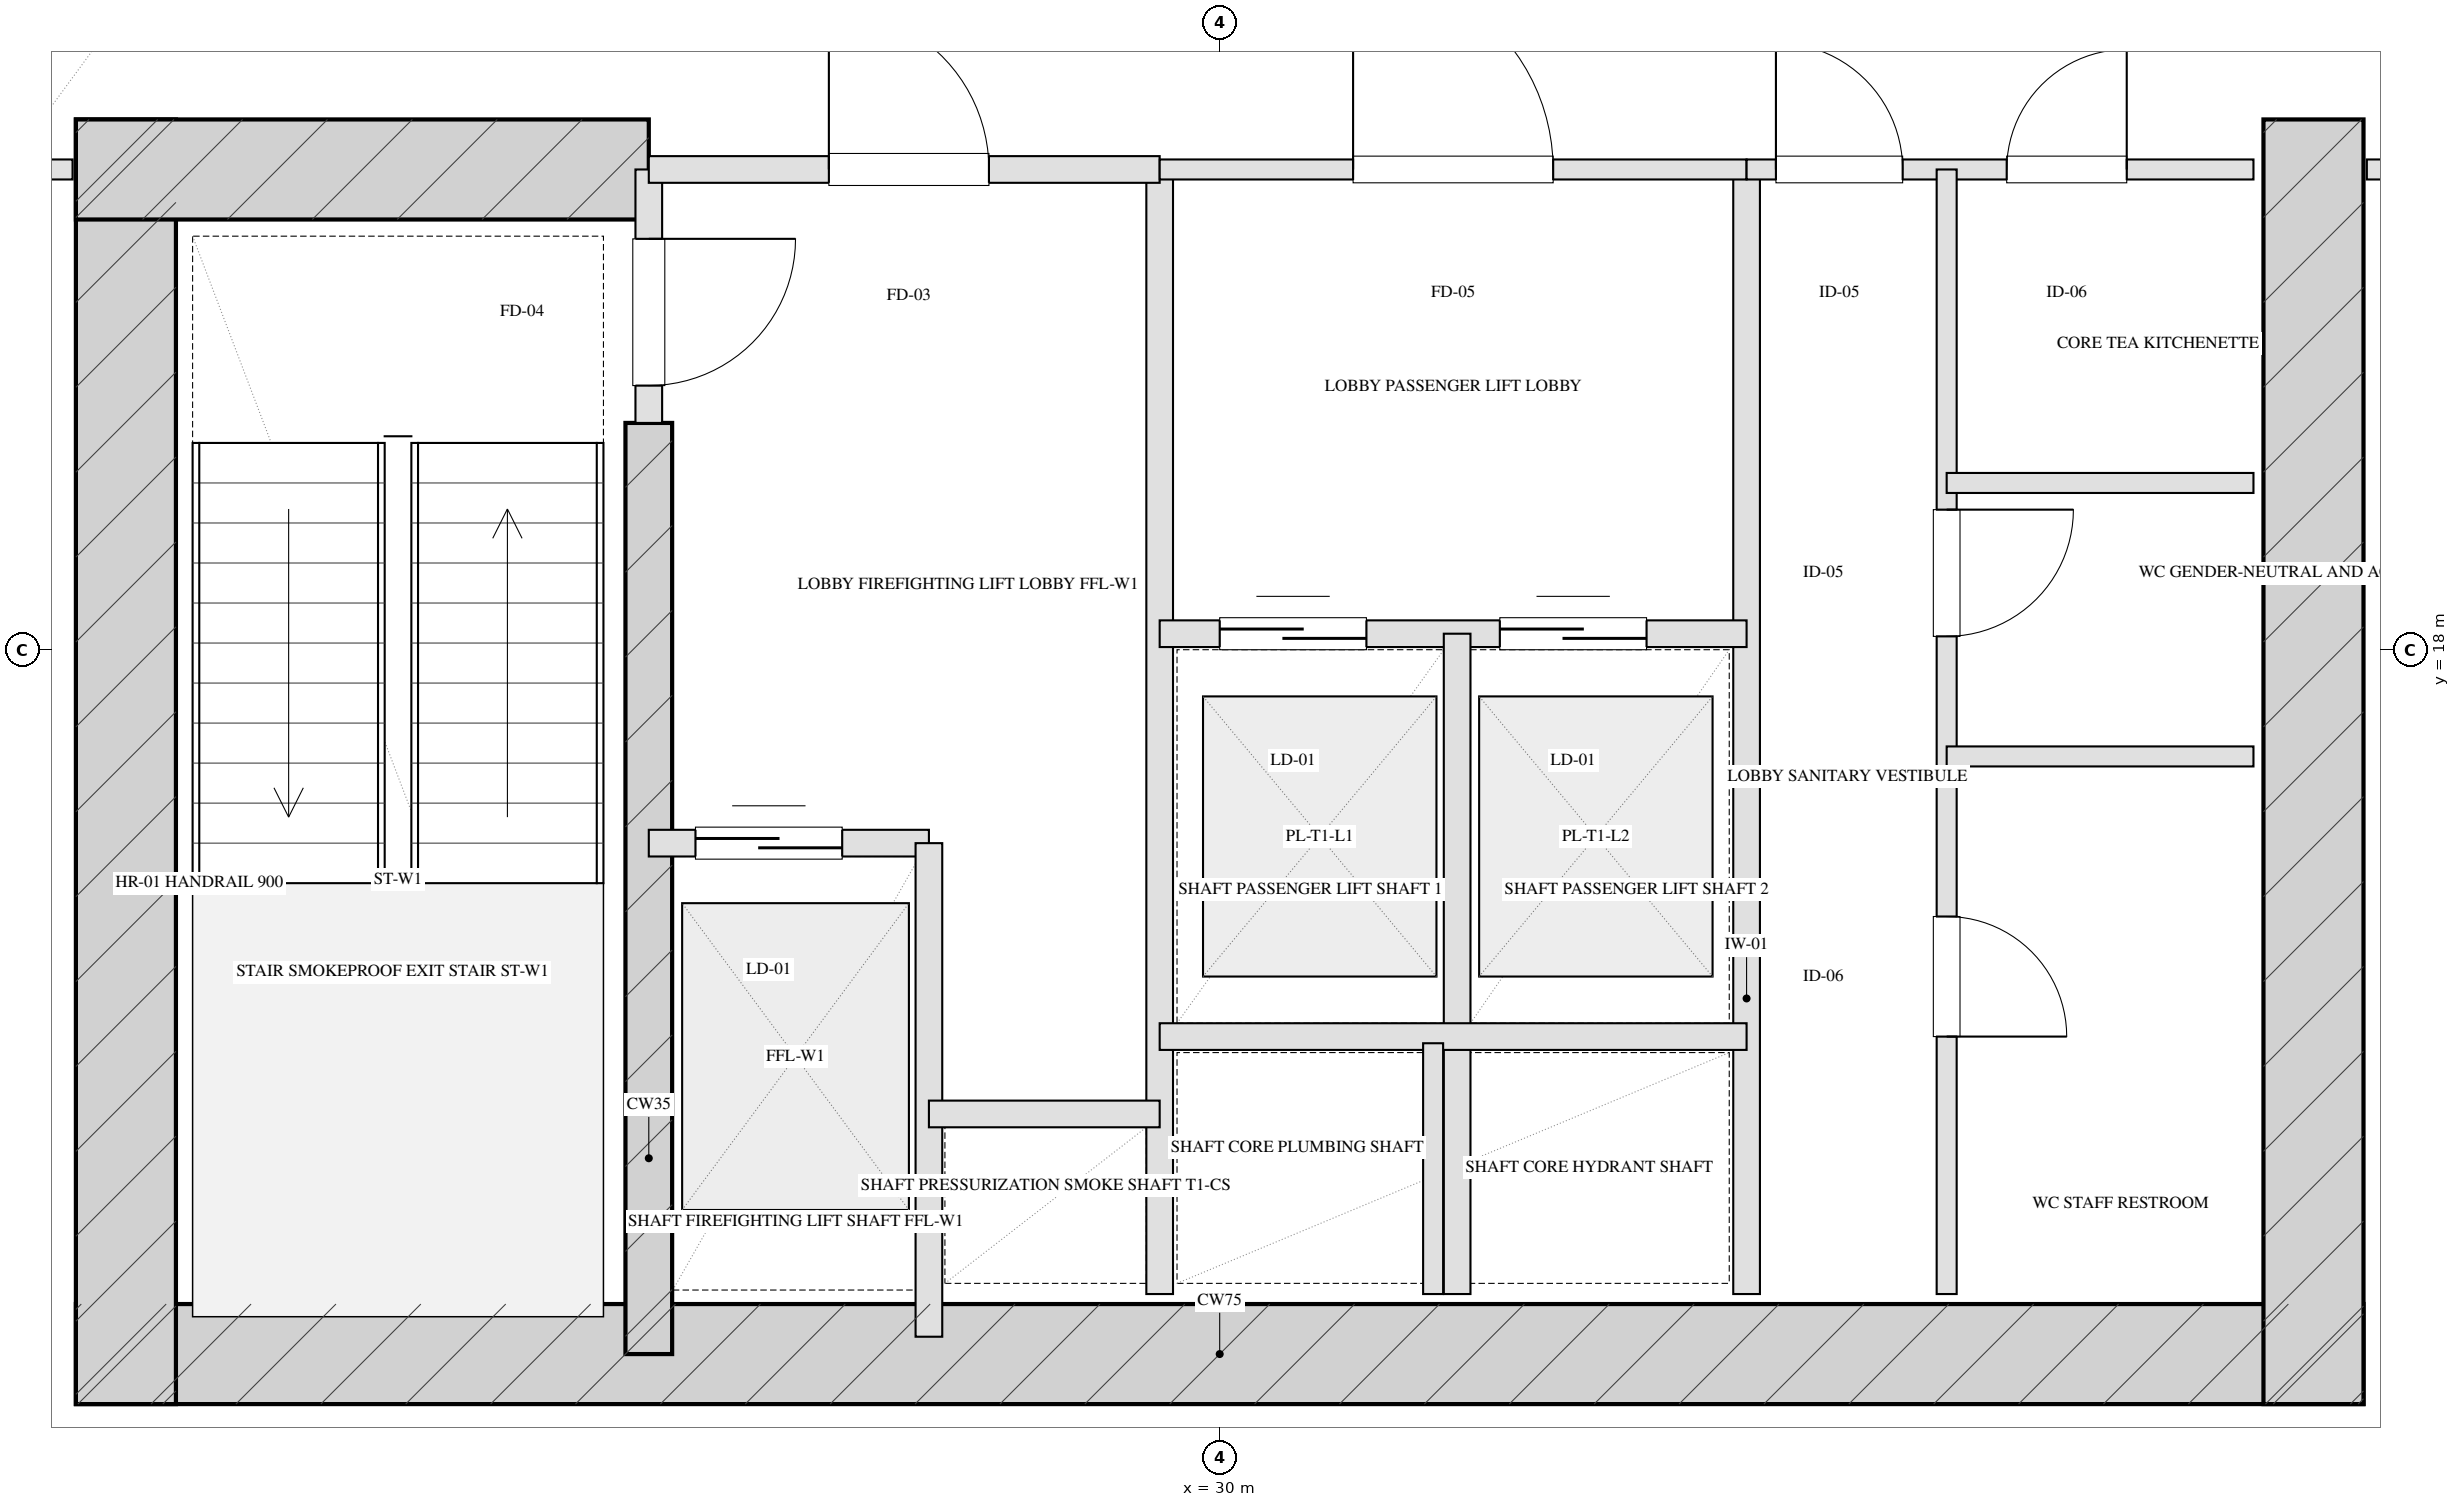
"""IFC4 building model, lengths in metres.
Left out: names, types, materials, properties, quantities, classifications, styles, units other than length and angle.
Written with IfcOpenShell. Run it as: python <this file> out.ifc"""

import sys

from ifc_helpers import new_model, si_unit, direction, frame, frame_2d, origin, place, context, subcontext, project, spatial, rectangle, extrude, element, fill, save


model = new_model("IFC4")
c1 = context("Model", 3, precision=1e-05, world=origin(), true_north=direction((0.0, 1.0)))
c2 = subcontext(c1, "Body", "Model", "MODEL_VIEW")
j1 = project(units=[si_unit("LENGTHUNIT", "METRE"), si_unit("PLANEANGLEUNIT", "RADIAN")], contexts=[c1])
p1 = place(None, origin())
s1 = spatial("IfcSite", under=j1, at=p1, CompositionType="ELEMENT")
p2 = place(p1, origin())
s2 = spatial("IfcBuilding", under=s1, at=p2, CompositionType="ELEMENT")
p3 = place(p2, frame((0.0, 0.0, 26.0)))
s3 = spatial("IfcBuildingStorey", under=s2, at=p3, CompositionType="ELEMENT", Elevation=26.0)
p4 = place(p3, frame((21.425, 12.72, 0.0), z_axis=(0.0, 0.0, 1.0), x_axis=(1.0, 0.0, 0.0)))
e1 = element("IfcWall", 1, at=p4, inside=s3, PredefinedType="SHEAR", context=c2, shape_type="SweptSolid", body=[
    extrude(rectangle(XDim=17.15, YDim=0.75, at=frame_2d((8.575, 0.0))), origin(), (0.0, 0.0, 1.0), 4.0),
])
for number, where, z_axis, x_axis in (
    (2, (21.8, 21.975, 0.0), (0.0, 0.0, 1.0), (0.0, -1.0, 0.0)),
    (3, (38.2, 21.975, 0.0), (0.0, 0.0, 1.0), (0.0, -1.0, 0.0)),
):
    element("IfcWall", number, at=place(p3, frame(where, z_axis=z_axis, x_axis=x_axis)), inside=s3, PredefinedType="SHEAR", context=c2, shape_type="SweptSolid", body=[
        extrude(rectangle(XDim=9.63, YDim=0.75, at=frame_2d((4.815, 0.0))), origin(), (0.0, 0.0, 1.0), 4.0),
    ])
p5 = place(p3, frame((25.72, 19.7, 0.0), z_axis=(0.0, 0.0, 1.0), x_axis=(0.0, -1.0, 0.0)))
e4 = element("IfcWall", 4, at=p5, inside=s3, PredefinedType="SHEAR", context=c2, shape_type="SweptSolid", body=[
    extrude(rectangle(XDim=6.98, YDim=0.35, at=frame_2d((3.49, 0.0))), origin(), (0.0, 0.0, 1.0), 4.0),
])
p6 = place(p3, frame((21.425, 21.6, 0.0), z_axis=(0.0, 0.0, 1.0), x_axis=(1.0, 0.0, 0.0)))
e5 = element("IfcWall", 5, at=p6, inside=s3, PredefinedType="SHEAR", context=c2, shape_type="SweptSolid", body=[
    extrude(rectangle(XDim=4.295, YDim=0.75, at=frame_2d((2.147, 0.0))), origin(), (0.0, 0.0, 1.0), 4.0),
])
p7 = place(p3, frame((25.72, 21.6, 0.0), z_axis=(0.0, 0.0, 1.0), x_axis=(0.0, -1.0, 0.0)))
e6 = element("IfcWall", 6, at=p7, inside=s3, PredefinedType="PARTITIONING", context=c2, shape_type="SweptSolid", body=[
    extrude(rectangle(XDim=1.9, YDim=0.2, at=frame_2d((0.95, 0.0))), origin(), (0.0, 0.0, 1.0), 3.725),
])
p8 = place(p7, frame((0.52, 0.0, 0.0)))
e7 = element("IfcOpeningElement", 7, at=p8, cuts=e6, PredefinedType="OPENING", context=c2, shape_type="SweptSolid", body=[
    extrude(rectangle(XDim=1.1, YDim=2.05, at=frame_2d((0.55, 1.025))), frame((0.0, 0.11, 0.0), z_axis=(0.0, -1.0, 0.0), x_axis=(1.0, 0.0, 0.0)), (0.0, 0.0, 1.0), 0.22),
])
p9 = place(p3, frame((29.55, 21.6, 0.0), z_axis=(0.0, 0.0, 1.0), x_axis=(0.0, -1.0, 0.0)))
e8 = element("IfcWall", 8, at=p9, inside=s3, PredefinedType="PARTITIONING", context=c2, shape_type="SweptSolid", body=[
    extrude(rectangle(XDim=8.43, YDim=0.2, at=frame_2d((4.215, 0.0))), origin(), (0.0, 0.0, 1.0), 3.725),
])
p10 = place(p3, frame((25.72, 21.6, 0.0), z_axis=(0.0, 0.0, 1.0), x_axis=(1.0, 0.0, 0.0)))
e9 = element("IfcWall", 9, at=p10, inside=s3, PredefinedType="PARTITIONING", context=c2, shape_type="SweptSolid", body=[
    extrude(rectangle(XDim=3.83, YDim=0.2, at=frame_2d((1.915, 0.0))), origin(), (0.0, 0.0, 1.0), 3.725),
])
p11 = place(p10, frame((1.35, 0.0, 0.0)))
e10 = element("IfcOpeningElement", 10, at=p11, cuts=e9, PredefinedType="OPENING", context=c2, shape_type="SweptSolid", body=[
    extrude(rectangle(XDim=1.2, YDim=2.05, at=frame_2d((0.6, 1.025))), frame((0.0, 0.11, 0.0), z_axis=(0.0, -1.0, 0.0), x_axis=(1.0, 0.0, 0.0)), (0.0, 0.0, 1.0), 0.22),
])
p12 = place(p3, frame((25.72, 16.55, 0.0), z_axis=(0.0, 0.0, 1.0), x_axis=(1.0, 0.0, 0.0)))
e11 = element("IfcWall", 11, at=p12, inside=s3, PredefinedType="PARTITIONING", context=c2, shape_type="SweptSolid", body=[
    extrude(rectangle(XDim=2.1, YDim=0.2, at=frame_2d((1.05, 0.0))), origin(), (0.0, 0.0, 1.0), 3.725),
])
p13 = place(p12, frame((0.35, 0.0, 0.0)))
e12 = element("IfcOpeningElement", 12, at=p13, cuts=e11, PredefinedType="OPENING", context=c2, shape_type="SweptSolid", body=[
    extrude(rectangle(XDim=1.1, YDim=2.05, at=frame_2d((0.55, 1.025))), frame((0.0, 0.11, 0.0), z_axis=(0.0, -1.0, 0.0), x_axis=(1.0, 0.0, 0.0)), (0.0, 0.0, 1.0), 0.22),
])
p14 = place(p3, frame((27.82, 16.55, 0.0), z_axis=(0.0, 0.0, 1.0), x_axis=(0.0, -1.0, 0.0)))
e13 = element("IfcWall", 13, at=p14, inside=s3, PredefinedType="PARTITIONING", context=c2, shape_type="SweptSolid", body=[
    extrude(rectangle(XDim=3.7, YDim=0.2, at=frame_2d((1.85, 0.0))), origin(), (0.0, 0.0, 1.0), 3.725),
])
p15 = place(p3, frame((27.82, 14.52, 0.0), z_axis=(0.0, 0.0, 1.0), x_axis=(1.0, 0.0, 0.0)))
e14 = element("IfcWall", 14, at=p15, inside=s3, PredefinedType="PARTITIONING", context=c2, shape_type="SweptSolid", body=[
    extrude(rectangle(XDim=1.73, YDim=0.2, at=frame_2d((0.865, 0.0))), origin(), (0.0, 0.0, 1.0), 3.725),
])
p16 = place(p3, frame((33.95, 21.6, 0.0), z_axis=(0.0, 0.0, 1.0), x_axis=(0.0, -1.0, 0.0)))
e15 = element("IfcWall", 15, at=p16, inside=s3, PredefinedType="PARTITIONING", context=c2, shape_type="SweptSolid", body=[
    extrude(rectangle(XDim=8.43, YDim=0.2, at=frame_2d((4.215, 0.0))), origin(), (0.0, 0.0, 1.0), 3.725),
])
p17 = place(p3, frame((29.55, 21.6, 0.0), z_axis=(0.0, 0.0, 1.0), x_axis=(1.0, 0.0, 0.0)))
e16 = element("IfcWall", 16, at=p17, inside=s3, PredefinedType="PARTITIONING", context=c2, shape_type="SweptSolid", body=[
    extrude(rectangle(XDim=4.4, YDim=0.15, at=frame_2d((2.2, 0.0))), origin(), (0.0, 0.0, 1.0), 3.725),
])
p18 = place(p17, frame((1.45, 0.0, 0.0)))
e17 = element("IfcOpeningElement", 17, at=p18, cuts=e16, PredefinedType="OPENING", context=c2, shape_type="SweptSolid", body=[
    extrude(rectangle(XDim=1.5, YDim=2.05, at=frame_2d((0.75, 1.025))), frame((0.0, 0.085, 0.0), z_axis=(0.0, -1.0, 0.0), x_axis=(1.0, 0.0, 0.0)), (0.0, 0.0, 1.0), 0.17),
])
p19 = place(p3, frame((29.55, 18.12, 0.0), z_axis=(0.0, 0.0, 1.0), x_axis=(1.0, 0.0, 0.0)))
e18 = element("IfcWall", 18, at=p19, inside=s3, PredefinedType="PARTITIONING", context=c2, shape_type="SweptSolid", body=[
    extrude(rectangle(XDim=4.4, YDim=0.2, at=frame_2d((2.2, 0.0))), origin(), (0.0, 0.0, 1.0), 3.725),
])
p20 = place(p19, frame((0.45, 0.0, 0.0)))
e19 = element("IfcOpeningElement", 19, at=p20, cuts=e18, PredefinedType="OPENING", context=c2, shape_type="SweptSolid", body=[
    extrude(rectangle(XDim=1.1, YDim=2.05, at=frame_2d((0.55, 1.025))), frame((0.0, 0.11, 0.0), z_axis=(0.0, -1.0, 0.0), x_axis=(1.0, 0.0, 0.0)), (0.0, 0.0, 1.0), 0.22),
])
p21 = place(p19, frame((2.55, 0.0, 0.0)))
e20 = element("IfcOpeningElement", 20, at=p21, cuts=e18, PredefinedType="OPENING", context=c2, shape_type="SweptSolid", body=[
    extrude(rectangle(XDim=1.1, YDim=2.05, at=frame_2d((0.55, 1.025))), frame((0.0, 0.11, 0.0), z_axis=(0.0, -1.0, 0.0), x_axis=(1.0, 0.0, 0.0)), (0.0, 0.0, 1.0), 0.22),
])
p22 = place(p3, frame((31.78, 18.12, 0.0), z_axis=(0.0, 0.0, 1.0), x_axis=(0.0, -1.0, 0.0)))
e21 = element("IfcWall", 21, at=p22, inside=s3, PredefinedType="PARTITIONING", context=c2, shape_type="SweptSolid", body=[
    extrude(rectangle(XDim=4.95, YDim=0.2, at=frame_2d((2.475, 0.0))), origin(), (0.0, 0.0, 1.0), 3.725),
])
p23 = place(p3, frame((29.55, 15.1, 0.0), z_axis=(0.0, 0.0, 1.0), x_axis=(1.0, 0.0, 0.0)))
e22 = element("IfcWall", 22, at=p23, inside=s3, PredefinedType="PARTITIONING", context=c2, shape_type="SweptSolid", body=[
    extrude(rectangle(XDim=4.4, YDim=0.2, at=frame_2d((2.2, 0.0))), origin(), (0.0, 0.0, 1.0), 3.725),
])
p24 = place(p3, frame((31.6, 15.05, 0.0), z_axis=(0.0, 0.0, 1.0), x_axis=(0.0, -1.0, 0.0)))
e23 = element("IfcWall", 23, at=p24, inside=s3, PredefinedType="PARTITIONING", context=c2, shape_type="SweptSolid", body=[
    extrude(rectangle(XDim=1.88, YDim=0.15, at=frame_2d((0.94, 0.0))), origin(), (0.0, 0.0, 1.0), 3.725),
])
p25 = place(p3, frame((33.95, 21.6, 0.0), z_axis=(0.0, 0.0, 1.0), x_axis=(1.0, 0.0, 0.0)))
e24 = element("IfcWall", 24, at=p25, inside=s3, PredefinedType="PARTITIONING", context=c2, shape_type="SweptSolid", body=[
    extrude(rectangle(XDim=3.8, YDim=0.15, at=frame_2d((1.9, 0.0))), origin(), (0.0, 0.0, 1.0), 3.725),
])
p26 = place(p25, frame((0.22, 0.0, 0.0)))
e25 = element("IfcOpeningElement", 25, at=p26, cuts=e24, PredefinedType="OPENING", context=c2, shape_type="SweptSolid", body=[
    extrude(rectangle(XDim=0.95, YDim=2.05, at=frame_2d((0.475, 1.025))), frame((0.0, 0.085, 0.0), z_axis=(0.0, -1.0, 0.0), x_axis=(1.0, 0.0, 0.0)), (0.0, 0.0, 1.0), 0.17),
])
p27 = place(p25, frame((1.95, 0.0, 0.0)))
e26 = element("IfcOpeningElement", 26, at=p27, cuts=e24, PredefinedType="OPENING", context=c2, shape_type="SweptSolid", body=[
    extrude(rectangle(XDim=0.9, YDim=2.05, at=frame_2d((0.45, 1.025))), frame((0.0, 0.085, 0.0), z_axis=(0.0, -1.0, 0.0), x_axis=(1.0, 0.0, 0.0)), (0.0, 0.0, 1.0), 0.17),
])
p28 = place(p3, frame((35.45, 21.6, 0.0), z_axis=(0.0, 0.0, 1.0), x_axis=(0.0, -1.0, 0.0)))
e27 = element("IfcWall", 27, at=p28, inside=s3, PredefinedType="PARTITIONING", context=c2, shape_type="SweptSolid", body=[
    extrude(rectangle(XDim=8.43, YDim=0.15, at=frame_2d((4.215, 0.0))), origin(), (0.0, 0.0, 1.0), 3.365),
])
p29 = place(p28, frame((2.55, 0.0, 0.0)))
e28 = element("IfcOpeningElement", 28, at=p29, cuts=e27, PredefinedType="OPENING", context=c2, shape_type="SweptSolid", body=[
    extrude(rectangle(XDim=0.95, YDim=2.05, at=frame_2d((0.475, 1.025))), frame((0.0, 0.085, 0.0), z_axis=(0.0, -1.0, 0.0), x_axis=(1.0, 0.0, 0.0)), (0.0, 0.0, 1.0), 0.17),
])
p30 = place(p28, frame((5.6, 0.0, 0.0)))
e29 = element("IfcOpeningElement", 29, at=p30, cuts=e27, PredefinedType="OPENING", context=c2, shape_type="SweptSolid", body=[
    extrude(rectangle(XDim=0.9, YDim=2.05, at=frame_2d((0.45, 1.025))), frame((0.0, 0.085, 0.0), z_axis=(0.0, -1.0, 0.0), x_axis=(1.0, 0.0, 0.0)), (0.0, 0.0, 1.0), 0.17),
])
for number, where, z_axis, x_axis in (
    (30, (35.45, 17.2, 0.0), (0.0, 0.0, 1.0), (1.0, 0.0, 0.0)),
    (31, (35.45, 19.25, 0.0), (0.0, 0.0, 1.0), (1.0, 0.0, 0.0)),
):
    element("IfcWall", number, at=place(p3, frame(where, z_axis=z_axis, x_axis=x_axis)), inside=s3, PredefinedType="PARTITIONING", context=c2, shape_type="SweptSolid", body=[
        extrude(rectangle(XDim=2.3, YDim=0.15, at=frame_2d((1.15, 0.0))), origin(), (0.0, 0.0, 1.0), 3.725),
    ])
p31 = place(p3, frame((10.6, 21.6, 0.0), z_axis=(0.0, 0.0, 1.0), x_axis=(1.0, 0.0, 0.0)))
e32 = element("IfcWall", 32, at=p31, inside=s3, PredefinedType="PARTITIONING", context=c2, shape_type="SweptSolid", body=[
    extrude(rectangle(XDim=10.8, YDim=0.15, at=frame_2d((5.4, 0.0))), origin(), (0.0, 0.0, 1.0), 3.725),
])
p32 = place(p31, frame((4.536, 0.0, 0.0)))
e33 = element("IfcOpeningElement", 33, at=p32, cuts=e32, PredefinedType="OPENING", context=c2, shape_type="SweptSolid", body=[
    extrude(rectangle(XDim=1.0, YDim=2.05, at=frame_2d((0.5, 1.025))), frame((0.0, 0.085, 0.0), z_axis=(0.0, -1.0, 0.0), x_axis=(1.0, 0.0, 0.0)), (0.0, 0.0, 1.0), 0.17),
])
p33 = place(p3, frame((38.6, 21.6, 0.0), z_axis=(0.0, 0.0, 1.0), x_axis=(1.0, 0.0, 0.0)))
e34 = element("IfcWall", 34, at=p33, inside=s3, PredefinedType="PARTITIONING", context=c2, shape_type="SweptSolid", body=[
    extrude(rectangle(XDim=10.8, YDim=0.15, at=frame_2d((5.4, 0.0))), origin(), (0.0, 0.0, 1.0), 3.725),
])
p34 = place(p33, frame((4.536, 0.0, 0.0)))
e35 = element("IfcOpeningElement", 35, at=p34, cuts=e34, PredefinedType="OPENING", context=c2, shape_type="SweptSolid", body=[
    extrude(rectangle(XDim=1.0, YDim=2.05, at=frame_2d((0.5, 1.025))), frame((0.0, 0.085, 0.0), z_axis=(0.0, -1.0, 0.0), x_axis=(1.0, 0.0, 0.0)), (0.0, 0.0, 1.0), 0.17),
])
p35 = place(p8, origin())
e36 = element("IfcDoor", 36, at=p35, inside=s3, OperationType="SINGLE_SWING_LEFT", PredefinedType="DOOR", context=c2, shape_type="SweptSolid", body=[
    extrude(rectangle(XDim=1.1, YDim=2.05, at=frame_2d((0.55, 1.025))), frame((0.0, 0.025, 0.0), z_axis=(0.0, -1.0, 0.0), x_axis=(1.0, 0.0, 0.0)), (0.0, 0.0, 1.0), 0.05),
])
fill(e7, e36)
p36 = place(p11, origin())
e37 = element("IfcDoor", 37, at=p36, inside=s3, OperationType="SINGLE_SWING_LEFT", PredefinedType="DOOR", context=c2, shape_type="SweptSolid", body=[
    extrude(rectangle(XDim=1.2, YDim=2.05, at=frame_2d((0.6, 1.025))), frame((0.0, 0.025, 0.0), z_axis=(0.0, -1.0, 0.0), x_axis=(1.0, 0.0, 0.0)), (0.0, 0.0, 1.0), 0.05),
])
fill(e10, e37)
p37 = place(p13, origin())
e38 = element("IfcDoor", 38, at=p37, inside=s3, OperationType="DOUBLE_DOOR_SLIDING", PredefinedType="DOOR", context=c2, shape_type="SweptSolid", body=[
    extrude(rectangle(XDim=1.1, YDim=2.05, at=frame_2d((0.55, 1.025))), frame((0.0, 0.025, 0.0), z_axis=(0.0, -1.0, 0.0), x_axis=(1.0, 0.0, 0.0)), (0.0, 0.0, 1.0), 0.05),
])
fill(e12, e38)
p38 = place(p18, origin())
e39 = element("IfcDoor", 39, at=p38, inside=s3, OperationType="SINGLE_SWING_LEFT", PredefinedType="DOOR", context=c2, shape_type="SweptSolid", body=[
    extrude(rectangle(XDim=1.5, YDim=2.05, at=frame_2d((0.75, 1.025))), frame((0.0, 0.025, 0.0), z_axis=(0.0, -1.0, 0.0), x_axis=(1.0, 0.0, 0.0)), (0.0, 0.0, 1.0), 0.05),
])
fill(e17, e39)
p39 = place(p20, origin())
e40 = element("IfcDoor", 40, at=p39, inside=s3, OperationType="DOUBLE_DOOR_SLIDING", PredefinedType="DOOR", context=c2, shape_type="SweptSolid", body=[
    extrude(rectangle(XDim=1.1, YDim=2.05, at=frame_2d((0.55, 1.025))), frame((0.0, 0.025, 0.0), z_axis=(0.0, -1.0, 0.0), x_axis=(1.0, 0.0, 0.0)), (0.0, 0.0, 1.0), 0.05),
])
fill(e19, e40)
p40 = place(p21, origin())
e41 = element("IfcDoor", 41, at=p40, inside=s3, OperationType="DOUBLE_DOOR_SLIDING", PredefinedType="DOOR", context=c2, shape_type="SweptSolid", body=[
    extrude(rectangle(XDim=1.1, YDim=2.05, at=frame_2d((0.55, 1.025))), frame((0.0, 0.025, 0.0), z_axis=(0.0, -1.0, 0.0), x_axis=(1.0, 0.0, 0.0)), (0.0, 0.0, 1.0), 0.05),
])
fill(e20, e41)
p41 = place(p26, origin())
e42 = element("IfcDoor", 42, at=p41, inside=s3, OperationType="SINGLE_SWING_LEFT", PredefinedType="DOOR", context=c2, shape_type="SweptSolid", body=[
    extrude(rectangle(XDim=0.95, YDim=2.05, at=frame_2d((0.475, 1.025))), frame((0.0, 0.025, 0.0), z_axis=(0.0, -1.0, 0.0), x_axis=(1.0, 0.0, 0.0)), (0.0, 0.0, 1.0), 0.05),
])
fill(e25, e42)
p42 = place(p27, origin())
e43 = element("IfcDoor", 43, at=p42, inside=s3, OperationType="SINGLE_SWING_RIGHT", PredefinedType="DOOR", context=c2, shape_type="SweptSolid", body=[
    extrude(rectangle(XDim=0.9, YDim=2.05, at=frame_2d((0.45, 1.025))), frame((0.0, 0.025, 0.0), z_axis=(0.0, -1.0, 0.0), x_axis=(1.0, 0.0, 0.0)), (0.0, 0.0, 1.0), 0.05),
])
fill(e26, e43)
p43 = place(p29, origin())
e44 = element("IfcDoor", 44, at=p43, inside=s3, OperationType="SINGLE_SWING_LEFT", PredefinedType="DOOR", context=c2, shape_type="SweptSolid", body=[
    extrude(rectangle(XDim=0.95, YDim=2.05, at=frame_2d((0.475, 1.025))), frame((0.0, 0.025, 0.0), z_axis=(0.0, -1.0, 0.0), x_axis=(1.0, 0.0, 0.0)), (0.0, 0.0, 1.0), 0.05),
])
fill(e28, e44)
p44 = place(p30, origin())
e45 = element("IfcDoor", 45, at=p44, inside=s3, OperationType="SINGLE_SWING_RIGHT", PredefinedType="DOOR", context=c2, shape_type="SweptSolid", body=[
    extrude(rectangle(XDim=0.9, YDim=2.05, at=frame_2d((0.45, 1.025))), frame((0.0, 0.025, 0.0), z_axis=(0.0, -1.0, 0.0), x_axis=(1.0, 0.0, 0.0)), (0.0, 0.0, 1.0), 0.05),
])
fill(e29, e45)
save(model, sys.argv[1])
